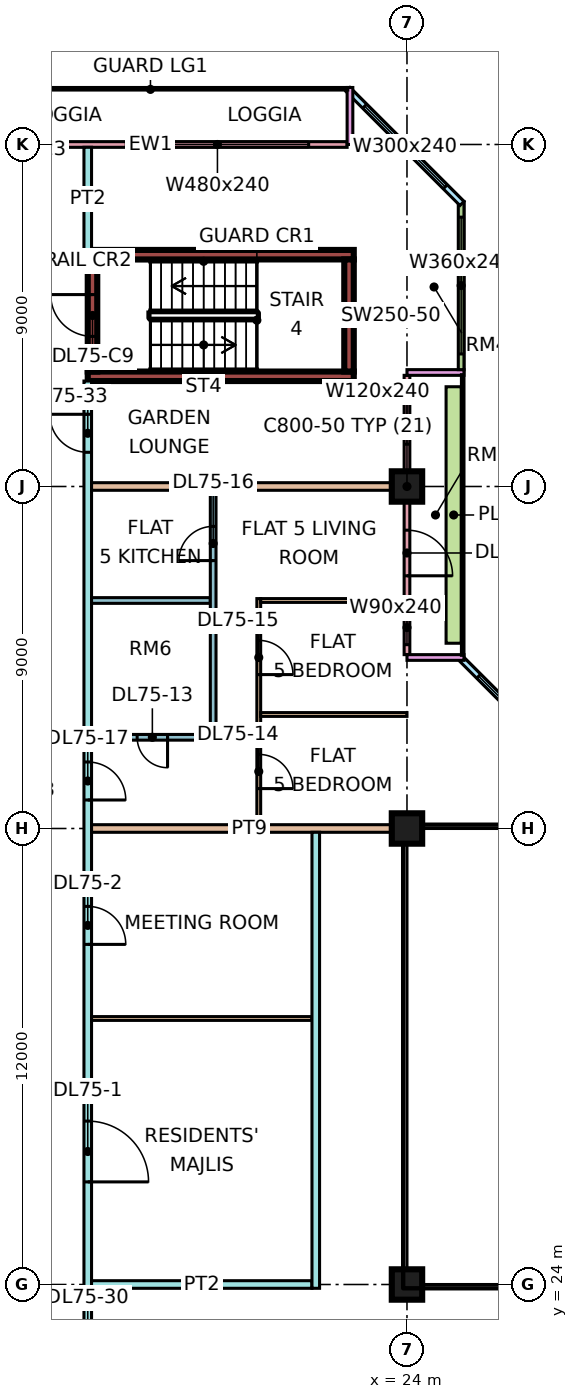
"""IFC4 building model, lengths in metres.
Left out: names, types, materials, properties, quantities, classifications, styles, units other than length and angle.
Written with IfcOpenShell. Run it as: python <this file> out.ifc"""

import sys

from ifc_helpers import new_model, si_unit, direction, frame, frame_2d, origin, origin_2d, place, context, subcontext, project, spatial, rectangle, extrude, element, fill, save


model = new_model("IFC4")
c1 = context("Model", 3, precision=1e-05, world=origin(), true_north=direction((0.0, 1.0)))
c2 = subcontext(c1, "Body", "Model", "MODEL_VIEW")
j1 = project(units=[si_unit("LENGTHUNIT", "METRE"), si_unit("PLANEANGLEUNIT", "RADIAN")], contexts=[c1])
p1 = place(None, origin())
s1 = spatial("IfcSite", under=j1, at=p1, CompositionType="ELEMENT")
p2 = place(p1, origin())
s2 = spatial("IfcBuilding", under=s1, at=p2, CompositionType="ELEMENT")
p3 = place(p2, frame((0.0, 0.0, 318.4)))
s3 = spatial("IfcBuildingStorey", under=s2, at=p3, CompositionType="ELEMENT", Elevation=318.4)
for number, where, z_axis, x_axis in (
    (1, (24.0, 24.0, 0.0), (0.0, 0.0, 1.0), (1.0, 0.0, 0.0)),
    (2, (24.0, 36.0, 0.0), (0.0, 0.0, 1.0), (1.0, 0.0, 0.0)),
    (3, (24.0, 45.0, 0.0), (0.0, 0.0, 1.0), (1.0, 0.0, 0.0)),
):
    element("IfcColumn", number, at=place(p3, frame(where, z_axis=z_axis, x_axis=x_axis)), inside=s3, PredefinedType="COLUMN", context=c2, shape_type="SweptSolid", body=[
        extrude(rectangle(XDim=0.8, YDim=0.8, at=origin_2d()), origin(), (0.0, 0.0, 1.0), 3.75),
    ])
for number, where, z_axis, x_axis in (
    (4, (15.6, 47.9, 0.0), (0.0, 0.0, 1.0), (1.0, 0.0, 0.0)),
    (5, (15.6, 51.1, 0.0), (0.0, 0.0, 1.0), (1.0, 0.0, 0.0)),
):
    element("IfcWall", number, at=place(p3, frame(where, z_axis=z_axis, x_axis=x_axis)), inside=s3, PredefinedType="SHEAR", context=c2, shape_type="SweptSolid", body=[
        extrude(rectangle(XDim=7.0, YDim=0.25, at=frame_2d((3.5, 0.0))), origin(), (0.0, 0.0, 1.0), 3.75),
    ])
p4 = place(p3, frame((15.725, 48.025, 0.0), z_axis=(0.0, 0.0, 1.0), x_axis=(0.0, 1.0, 0.0)))
e6 = element("IfcWall", 6, at=p4, inside=s3, PredefinedType="SHEAR", context=c2, shape_type="SweptSolid", body=[
    extrude(rectangle(XDim=2.95, YDim=0.25, at=frame_2d((1.475, 0.0))), origin(), (0.0, 0.0, 1.0), 3.75),
])
p5 = place(p4, frame((0.925, 0.0, 0.0)))
e7 = element("IfcOpeningElement", 7, at=p5, cuts=e6, PredefinedType="OPENING", context=c2, shape_type="SweptSolid", body=[
    extrude(rectangle(XDim=1.1, YDim=2.2, at=frame_2d((0.55, 1.1))), frame((0.0, 0.135, 0.0), z_axis=(0.0, -1.0, 0.0), x_axis=(1.0, 0.0, 0.0)), (0.0, 0.0, 1.0), 0.27),
])
p6 = place(p3, frame((22.475, 48.025, 0.0), z_axis=(0.0, 0.0, 1.0), x_axis=(0.0, 1.0, 0.0)))
e8 = element("IfcWall", 8, at=p6, inside=s3, PredefinedType="SHEAR", context=c2, shape_type="SweptSolid", body=[
    extrude(rectangle(XDim=2.95, YDim=0.25, at=frame_2d((1.475, 0.0))), origin(), (0.0, 0.0, 1.0), 3.75),
])
p7 = place(p3, frame((28.447, 37.447, 0.0), z_axis=(0.0, 0.0, 1.0), x_axis=(-0.707106781187, 0.707106781187, 0.0)))
e9 = element("IfcWall", 9, at=p7, inside=s3, PredefinedType="SOLIDWALL", context=c2, shape_type="SweptSolid", body=[
    extrude(rectangle(XDim=4.243, YDim=0.15, at=frame_2d((2.121, 0.0))), origin(), (0.0, 0.0, 1.0), 3.3),
])
p8 = place(p7, frame((0.621, 0.0, 0.45)))
e10 = element("IfcOpeningElement", 10, at=p8, cuts=e9, PredefinedType="OPENING", context=c2, shape_type="SweptSolid", body=[
    extrude(rectangle(XDim=3.0, YDim=2.4, at=frame_2d((1.5, 1.2))), frame((0.0, 0.085, 0.0), z_axis=(0.0, -1.0, 0.0), x_axis=(1.0, 0.0, 0.0)), (0.0, 0.0, 1.0), 0.17),
])
p9 = place(p3, frame((24.0, 40.575, 0.0), z_axis=(0.0, 0.0, 1.0), x_axis=(0.0, 1.0, 0.0)))
e11 = element("IfcWall", 11, at=p9, inside=s3, PredefinedType="SOLIDWALL", context=c2, shape_type="SweptSolid", body=[
    extrude(rectangle(XDim=7.35, YDim=0.15, at=frame_2d((3.675, 0.0))), origin(), (0.0, 0.0, 1.0), 3.3),
])
p10 = place(p9, frame((0.262, 0.0, 0.45)))
e12 = element("IfcOpeningElement", 12, at=p10, cuts=e11, PredefinedType="OPENING", context=c2, shape_type="SweptSolid", body=[
    extrude(rectangle(XDim=0.9, YDim=2.4, at=frame_2d((0.45, 1.2))), frame((0.0, 0.085, 0.0), z_axis=(0.0, -1.0, 0.0), x_axis=(1.0, 0.0, 0.0)), (0.0, 0.0, 1.0), 0.17),
])
p11 = place(p9, frame((2.075, 0.0, 0.0)))
e13 = element("IfcOpeningElement", 13, at=p11, cuts=e11, PredefinedType="OPENING", context=c2, shape_type="SweptSolid", body=[
    extrude(rectangle(XDim=1.2, YDim=2.4, at=frame_2d((0.6, 1.2))), frame((0.0, 0.085, 0.0), z_axis=(0.0, -1.0, 0.0), x_axis=(1.0, 0.0, 0.0)), (0.0, 0.0, 1.0), 0.17),
])
p12 = place(p9, frame((5.538, 0.0, 0.45)))
e14 = element("IfcOpeningElement", 14, at=p12, cuts=e11, PredefinedType="OPENING", context=c2, shape_type="SweptSolid", body=[
    extrude(rectangle(XDim=1.2, YDim=2.4, at=frame_2d((0.6, 1.2))), frame((0.0, 0.085, 0.0), z_axis=(0.0, -1.0, 0.0), x_axis=(1.0, 0.0, 0.0)), (0.0, 0.0, 1.0), 0.17),
])
for number, where, z_axis, x_axis in (
    (15, (25.5, 40.5, 0.0), (0.0, 0.0, 1.0), (-1.0, 0.0, 0.0)),
    (16, (25.5, 48.0, 0.0), (0.0, 0.0, 1.0), (-1.0, 0.0, 0.0)),
):
    element("IfcWall", number, at=place(p3, frame(where, z_axis=z_axis, x_axis=x_axis)), inside=s3, PredefinedType="SOLIDWALL", context=c2, shape_type="SweptSolid", body=[
        extrude(rectangle(XDim=1.5, YDim=0.15, at=frame_2d((0.75, 0.0))), origin(), (0.0, 0.0, 1.0), 3.3),
    ])
p13 = place(p3, frame((25.425, 48.075, 0.0), z_axis=(0.0, 0.0, 1.0), x_axis=(0.0, 1.0, 0.0)))
e17 = element("IfcWall", 17, at=p13, inside=s3, PredefinedType="SOLIDWALL", context=c2, shape_type="SweptSolid", body=[
    extrude(rectangle(XDim=4.425, YDim=0.15, at=frame_2d((2.212, 0.0))), origin(), (0.0, 0.0, 1.0), 3.3),
])
p14 = place(p13, frame((0.413, 0.0, 0.45)))
e18 = element("IfcOpeningElement", 18, at=p14, cuts=e17, PredefinedType="OPENING", context=c2, shape_type="SweptSolid", body=[
    extrude(rectangle(XDim=3.6, YDim=2.4, at=frame_2d((1.8, 1.2))), frame((0.0, 0.085, 0.0), z_axis=(0.0, -1.0, 0.0), x_axis=(1.0, 0.0, 0.0)), (0.0, 0.0, 1.0), 0.17),
])
p15 = place(p3, frame((25.447, 52.447, 0.0), z_axis=(0.0, 0.0, 1.0), x_axis=(-0.707106781187, 0.707106781187, 0.0)))
e19 = element("IfcWall", 19, at=p15, inside=s3, PredefinedType="SOLIDWALL", context=c2, shape_type="SweptSolid", body=[
    extrude(rectangle(XDim=4.243, YDim=0.15, at=frame_2d((2.121, 0.0))), origin(), (0.0, 0.0, 1.0), 3.3),
])
p16 = place(p15, frame((0.621, 0.0, 0.45)))
e20 = element("IfcOpeningElement", 20, at=p16, cuts=e19, PredefinedType="OPENING", context=c2, shape_type="SweptSolid", body=[
    extrude(rectangle(XDim=3.0, YDim=2.4, at=frame_2d((1.5, 1.2))), frame((0.0, 0.085, 0.0), z_axis=(0.0, -1.0, 0.0), x_axis=(1.0, 0.0, 0.0)), (0.0, 0.0, 1.0), 0.17),
])
p17 = place(p3, frame((22.425, 54.0, 0.0), z_axis=(0.0, 0.0, 1.0), x_axis=(-1.0, 0.0, 0.0)))
e21 = element("IfcWall", 21, at=p17, inside=s3, PredefinedType="SOLIDWALL", context=c2, shape_type="SweptSolid", body=[
    extrude(rectangle(XDim=10.35, YDim=0.15, at=frame_2d((5.175, 0.0))), origin(), (0.0, 0.0, 1.0), 3.3),
])
p18 = place(p17, frame((1.012, 0.0, 0.45)))
e22 = element("IfcOpeningElement", 22, at=p18, cuts=e21, PredefinedType="OPENING", context=c2, shape_type="SweptSolid", body=[
    extrude(rectangle(XDim=4.8, YDim=2.4, at=frame_2d((2.4, 1.2))), frame((0.0, 0.085, 0.0), z_axis=(0.0, -1.0, 0.0), x_axis=(1.0, 0.0, 0.0)), (0.0, 0.0, 1.0), 0.17),
])
p19 = place(p3, frame((22.5, 55.5, 0.0), z_axis=(0.0, 0.0, 1.0), x_axis=(0.0, -1.0, 0.0)))
e23 = element("IfcWall", 23, at=p19, inside=s3, PredefinedType="SOLIDWALL", context=c2, shape_type="SweptSolid", body=[
    extrude(rectangle(XDim=1.5, YDim=0.15, at=frame_2d((0.75, 0.0))), origin(), (0.0, 0.0, 1.0), 3.3),
])
p20 = place(p3, frame((25.229, 40.875, 0.0), z_axis=(0.0, 0.0, 1.0), x_axis=(0.0, 1.0, 0.0)))
e24 = element("IfcWall", 24, at=p20, inside=s3, PredefinedType="SOLIDWALL", context=c2, shape_type="SweptSolid", body=[
    extrude(rectangle(XDim=6.75, YDim=0.4, at=frame_2d((3.375, 0.0))), origin(), (0.0, 0.0, 1.0), 0.7),
])
p21 = place(p3, frame((15.6, 20.0, 0.0), z_axis=(0.0, 0.0, 1.0), x_axis=(0.0, 1.0, 0.0)))
e25 = element("IfcWall", 25, at=p21, inside=s3, PredefinedType="PARTITIONING", context=c2, shape_type="SweptSolid", body=[
    extrude(rectangle(XDim=27.775, YDim=0.2, at=frame_2d((13.887, 0.0))), origin(), (0.0, 0.0, 1.0), 3.3),
])
p22 = place(p21, frame((6.7, 0.0, 0.0)))
e26 = element("IfcOpeningElement", 26, at=p22, cuts=e25, PredefinedType="OPENING", context=c2, shape_type="SweptSolid", body=[
    extrude(rectangle(XDim=1.6, YDim=2.1, at=frame_2d((0.8, 1.05))), frame((0.0, 0.11, 0.0), z_axis=(0.0, -1.0, 0.0), x_axis=(1.0, 0.0, 0.0)), (0.0, 0.0, 1.0), 0.22),
])
p23 = place(p21, frame((12.95, 0.0, 0.0)))
e27 = element("IfcOpeningElement", 27, at=p23, cuts=e25, PredefinedType="OPENING", context=c2, shape_type="SweptSolid", body=[
    extrude(rectangle(XDim=1.0, YDim=2.1, at=frame_2d((0.5, 1.05))), frame((0.0, 0.11, 0.0), z_axis=(0.0, -1.0, 0.0), x_axis=(1.0, 0.0, 0.0)), (0.0, 0.0, 1.0), 0.22),
])
p24 = place(p21, frame((16.75, 0.0, 0.0)))
e28 = element("IfcOpeningElement", 28, at=p24, cuts=e25, PredefinedType="OPENING", context=c2, shape_type="SweptSolid", body=[
    extrude(rectangle(XDim=1.0, YDim=2.1, at=frame_2d((0.5, 1.05))), frame((0.0, 0.11, 0.0), z_axis=(0.0, -1.0, 0.0), x_axis=(1.0, 0.0, 0.0)), (0.0, 0.0, 1.0), 0.22),
])
p25 = place(p21, frame((1.15, 0.0, 0.0)))
e29 = element("IfcOpeningElement", 29, at=p25, cuts=e25, PredefinedType="OPENING", context=c2, shape_type="SweptSolid", body=[
    extrude(rectangle(XDim=1.8, YDim=2.1, at=frame_2d((0.9, 1.05))), frame((0.0, 0.11, 0.0), z_axis=(0.0, -1.0, 0.0), x_axis=(1.0, 0.0, 0.0)), (0.0, 0.0, 1.0), 0.22),
])
p26 = place(p21, frame((25.9, 0.0, 0.0)))
e30 = element("IfcOpeningElement", 30, at=p26, cuts=e25, PredefinedType="OPENING", context=c2, shape_type="SweptSolid", body=[
    extrude(rectangle(XDim=1.0, YDim=2.1, at=frame_2d((0.5, 1.05))), frame((0.0, 0.11, 0.0), z_axis=(0.0, -1.0, 0.0), x_axis=(1.0, 0.0, 0.0)), (0.0, 0.0, 1.0), 0.22),
])
p27 = place(p3, frame((15.6, 51.225, 0.0), z_axis=(0.0, 0.0, 1.0), x_axis=(0.0, 1.0, 0.0)))
e31 = element("IfcWall", 31, at=p27, inside=s3, PredefinedType="PARTITIONING", context=c2, shape_type="SweptSolid", body=[
    extrude(rectangle(XDim=2.701, YDim=0.2, at=frame_2d((1.351, 0.0))), origin(), (0.0, 0.0, 1.0), 3.3),
])
p28 = place(p3, frame((15.7, 24.0, 0.0), z_axis=(0.0, 0.0, 1.0), x_axis=(1.0, 0.0, 0.0)))
e32 = element("IfcWall", 32, at=p28, inside=s3, PredefinedType="PARTITIONING", context=c2, shape_type="SweptSolid", body=[
    extrude(rectangle(XDim=5.8, YDim=0.2, at=frame_2d((2.9, 0.0))), origin(), (0.0, 0.0, 1.0), 3.3),
])
p29 = place(p3, frame((15.7, 31.0, 0.0), z_axis=(0.0, 0.0, 1.0), x_axis=(1.0, 0.0, 0.0)))
e33 = element("IfcWall", 33, at=p29, inside=s3, PredefinedType="PARTITIONING", context=c2, shape_type="SweptSolid", body=[
    extrude(rectangle(XDim=5.8, YDim=0.1, at=frame_2d((2.9, 0.0))), origin(), (0.0, 0.0, 1.0), 3.3),
])
p30 = place(p3, frame((15.7, 36.0, 0.0), z_axis=(0.0, 0.0, 1.0), x_axis=(1.0, 0.0, 0.0)))
e34 = element("IfcWall", 34, at=p30, inside=s3, PredefinedType="PARTITIONING", context=c2, shape_type="SweptSolid", body=[
    extrude(rectangle(XDim=8.3, YDim=0.2, at=frame_2d((4.15, 0.0))), origin(), (0.0, 0.0, 1.0), 3.3),
])
p31 = place(p3, frame((15.7, 38.4, 0.0), z_axis=(0.0, 0.0, 1.0), x_axis=(1.0, 0.0, 0.0)))
e35 = element("IfcWall", 35, at=p31, inside=s3, PredefinedType="PARTITIONING", context=c2, shape_type="SweptSolid", body=[
    extrude(rectangle(XDim=3.125, YDim=0.15, at=frame_2d((1.562, 0.0))), origin(), (0.0, 0.0, 1.0), 3.3),
])
p32 = place(p31, frame((1.2, 0.0, 0.0)))
e36 = element("IfcOpeningElement", 36, at=p32, cuts=e35, PredefinedType="OPENING", context=c2, shape_type="SweptSolid", body=[
    extrude(rectangle(XDim=0.8, YDim=2.1, at=frame_2d((0.4, 1.05))), frame((0.0, 0.085, 0.0), z_axis=(0.0, -1.0, 0.0), x_axis=(1.0, 0.0, 0.0)), (0.0, 0.0, 1.0), 0.17),
])
p33 = place(p3, frame((15.7, 42.0, 0.0), z_axis=(0.0, 0.0, 1.0), x_axis=(1.0, 0.0, 0.0)))
e37 = element("IfcWall", 37, at=p33, inside=s3, PredefinedType="PARTITIONING", context=c2, shape_type="SweptSolid", body=[
    extrude(rectangle(XDim=3.125, YDim=0.15, at=frame_2d((1.562, 0.0))), origin(), (0.0, 0.0, 1.0), 3.3),
])
p34 = place(p3, frame((15.7, 45.0, 0.0), z_axis=(0.0, 0.0, 1.0), x_axis=(1.0, 0.0, 0.0)))
e38 = element("IfcWall", 38, at=p34, inside=s3, PredefinedType="PARTITIONING", context=c2, shape_type="SweptSolid", body=[
    extrude(rectangle(XDim=8.226, YDim=0.2, at=frame_2d((4.113, 0.0))), origin(), (0.0, 0.0, 1.0), 3.3),
])
p35 = place(p3, frame((18.9, 38.325, 0.0), z_axis=(0.0, 0.0, 1.0), x_axis=(0.0, 1.0, 0.0)))
e39 = element("IfcWall", 39, at=p35, inside=s3, PredefinedType="PARTITIONING", context=c2, shape_type="SweptSolid", body=[
    extrude(rectangle(XDim=6.575, YDim=0.15, at=frame_2d((3.288, 0.0))), origin(), (0.0, 0.0, 1.0), 3.3),
])
p36 = place(p35, frame((4.725, 0.0, 0.0)))
e40 = element("IfcOpeningElement", 40, at=p36, cuts=e39, PredefinedType="OPENING", context=c2, shape_type="SweptSolid", body=[
    extrude(rectangle(XDim=0.9, YDim=2.1, at=frame_2d((0.45, 1.05))), frame((0.0, 0.085, 0.0), z_axis=(0.0, -1.0, 0.0), x_axis=(1.0, 0.0, 0.0)), (0.0, 0.0, 1.0), 0.17),
])
p37 = place(p3, frame((20.1, 36.1, 0.0), z_axis=(0.0, 0.0, 1.0), x_axis=(0.0, 1.0, 0.0)))
e41 = element("IfcWall", 41, at=p37, inside=s3, PredefinedType="PARTITIONING", context=c2, shape_type="SweptSolid", body=[
    extrude(rectangle(XDim=5.95, YDim=0.1, at=frame_2d((2.975, 0.0))), origin(), (0.0, 0.0, 1.0), 3.3),
])
p38 = place(p37, frame((0.95, 0.0, 0.0)))
e42 = element("IfcOpeningElement", 42, at=p38, cuts=e41, PredefinedType="OPENING", context=c2, shape_type="SweptSolid", body=[
    extrude(rectangle(XDim=0.9, YDim=2.1, at=frame_2d((0.45, 1.05))), frame((0.0, 0.06, 0.0), z_axis=(0.0, -1.0, 0.0), x_axis=(1.0, 0.0, 0.0)), (0.0, 0.0, 1.0), 0.12),
])
p39 = place(p37, frame((3.95, 0.0, 0.0)))
e43 = element("IfcOpeningElement", 43, at=p39, cuts=e41, PredefinedType="OPENING", context=c2, shape_type="SweptSolid", body=[
    extrude(rectangle(XDim=0.9, YDim=2.1, at=frame_2d((0.45, 1.05))), frame((0.0, 0.06, 0.0), z_axis=(0.0, -1.0, 0.0), x_axis=(1.0, 0.0, 0.0)), (0.0, 0.0, 1.0), 0.12),
])
p40 = place(p3, frame((20.15, 39.0, 0.0), z_axis=(0.0, 0.0, 1.0), x_axis=(1.0, 0.0, 0.0)))
e44 = element("IfcWall", 44, at=p40, inside=s3, PredefinedType="PARTITIONING", context=c2, shape_type="SweptSolid", body=[
    extrude(rectangle(XDim=3.85, YDim=0.1, at=frame_2d((1.925, 0.0))), origin(), (0.0, 0.0, 1.0), 3.3),
])
p41 = place(p3, frame((20.15, 42.0, 0.0), z_axis=(0.0, 0.0, 1.0), x_axis=(1.0, 0.0, 0.0)))
e45 = element("IfcWall", 45, at=p41, inside=s3, PredefinedType="PARTITIONING", context=c2, shape_type="SweptSolid", body=[
    extrude(rectangle(XDim=3.776, YDim=0.1, at=frame_2d((1.888, 0.0))), origin(), (0.0, 0.0, 1.0), 3.3),
])
p42 = place(p3, frame((21.6, 23.9, 0.0), z_axis=(0.0, 0.0, 1.0), x_axis=(0.0, 1.0, 0.0)))
e46 = element("IfcWall", 46, at=p42, inside=s3, PredefinedType="PARTITIONING", context=c2, shape_type="SweptSolid", body=[
    extrude(rectangle(XDim=12.0, YDim=0.2, at=frame_2d((6.0, 0.0))), origin(), (0.0, 0.0, 1.0), 3.3),
])
p43 = place(p8, origin())
e47 = element("IfcWindow", 47, at=p43, inside=s3, PartitioningType="SINGLE_PANEL", PredefinedType="WINDOW", context=c2, shape_type="SweptSolid", body=[
    extrude(rectangle(XDim=3.0, YDim=2.4, at=frame_2d((1.5, 1.2))), frame((0.0, 0.03, 0.0), z_axis=(0.0, -1.0, 0.0), x_axis=(1.0, 0.0, 0.0)), (0.0, 0.0, 1.0), 0.06),
])
fill(e10, e47)
p44 = place(p10, origin())
e48 = element("IfcWindow", 48, at=p44, inside=s3, PartitioningType="SINGLE_PANEL", PredefinedType="WINDOW", context=c2, shape_type="SweptSolid", body=[
    extrude(rectangle(XDim=0.9, YDim=2.4, at=frame_2d((0.45, 1.2))), frame((0.0, 0.03, 0.0), z_axis=(0.0, -1.0, 0.0), x_axis=(1.0, 0.0, 0.0)), (0.0, 0.0, 1.0), 0.06),
])
fill(e12, e48)
p45 = place(p11, frame((1.2, 0.0, 0.0), z_axis=(0.0, 0.0, 1.0), x_axis=(-1.0, 0.0, 0.0)))
e49 = element("IfcDoor", 49, at=p45, inside=s3, OperationType="DOUBLE_DOOR_SINGLE_SWING", PredefinedType="DOOR", context=c2, shape_type="SweptSolid", body=[
    extrude(rectangle(XDim=1.2, YDim=2.4, at=frame_2d((0.6, 1.2))), frame((0.0, 0.025, 0.0), z_axis=(0.0, -1.0, 0.0), x_axis=(1.0, 0.0, 0.0)), (0.0, 0.0, 1.0), 0.05),
])
fill(e13, e49)
p46 = place(p12, origin())
e50 = element("IfcWindow", 50, at=p46, inside=s3, PartitioningType="SINGLE_PANEL", PredefinedType="WINDOW", context=c2, shape_type="SweptSolid", body=[
    extrude(rectangle(XDim=1.2, YDim=2.4, at=frame_2d((0.6, 1.2))), frame((0.0, 0.03, 0.0), z_axis=(0.0, -1.0, 0.0), x_axis=(1.0, 0.0, 0.0)), (0.0, 0.0, 1.0), 0.06),
])
fill(e14, e50)
p47 = place(p14, origin())
e51 = element("IfcWindow", 51, at=p47, inside=s3, PartitioningType="SINGLE_PANEL", PredefinedType="WINDOW", context=c2, shape_type="SweptSolid", body=[
    extrude(rectangle(XDim=3.6, YDim=2.4, at=frame_2d((1.8, 1.2))), frame((0.0, 0.03, 0.0), z_axis=(0.0, -1.0, 0.0), x_axis=(1.0, 0.0, 0.0)), (0.0, 0.0, 1.0), 0.06),
])
fill(e18, e51)
p48 = place(p16, origin())
e52 = element("IfcWindow", 52, at=p48, inside=s3, PartitioningType="SINGLE_PANEL", PredefinedType="WINDOW", context=c2, shape_type="SweptSolid", body=[
    extrude(rectangle(XDim=3.0, YDim=2.4, at=frame_2d((1.5, 1.2))), frame((0.0, 0.03, 0.0), z_axis=(0.0, -1.0, 0.0), x_axis=(1.0, 0.0, 0.0)), (0.0, 0.0, 1.0), 0.06),
])
fill(e20, e52)
p49 = place(p18, origin())
e53 = element("IfcWindow", 53, at=p49, inside=s3, PartitioningType="SINGLE_PANEL", PredefinedType="WINDOW", context=c2, shape_type="SweptSolid", body=[
    extrude(rectangle(XDim=4.8, YDim=2.4, at=frame_2d((2.4, 1.2))), frame((0.0, 0.03, 0.0), z_axis=(0.0, -1.0, 0.0), x_axis=(1.0, 0.0, 0.0)), (0.0, 0.0, 1.0), 0.06),
])
fill(e22, e53)
p50 = place(p5, frame((1.1, 0.0, 0.0), z_axis=(0.0, 0.0, 1.0), x_axis=(-1.0, 0.0, 0.0)))
e54 = element("IfcDoor", 54, at=p50, inside=s3, OperationType="SINGLE_SWING_RIGHT", PredefinedType="DOOR", context=c2, shape_type="SweptSolid", body=[
    extrude(rectangle(XDim=1.1, YDim=2.2, at=frame_2d((0.55, 1.1))), frame((0.0, 0.025, 0.0), z_axis=(0.0, -1.0, 0.0), x_axis=(1.0, 0.0, 0.0)), (0.0, 0.0, 1.0), 0.05),
])
fill(e7, e54)
p51 = place(p22, frame((1.6, 0.0, 0.0), z_axis=(0.0, 0.0, 1.0), x_axis=(-1.0, 0.0, 0.0)))
e55 = element("IfcDoor", 55, at=p51, inside=s3, OperationType="DOUBLE_DOOR_SINGLE_SWING", PredefinedType="DOOR", context=c2, shape_type="SweptSolid", body=[
    extrude(rectangle(XDim=1.6, YDim=2.1, at=frame_2d((0.8, 1.05))), frame((0.0, 0.025, 0.0), z_axis=(0.0, -1.0, 0.0), x_axis=(1.0, 0.0, 0.0)), (0.0, 0.0, 1.0), 0.05),
])
fill(e26, e55)
p52 = place(p23, frame((1.0, 0.0, 0.0), z_axis=(0.0, 0.0, 1.0), x_axis=(-1.0, 0.0, 0.0)))
e56 = element("IfcDoor", 56, at=p52, inside=s3, OperationType="SINGLE_SWING_LEFT", PredefinedType="DOOR", context=c2, shape_type="SweptSolid", body=[
    extrude(rectangle(XDim=1.0, YDim=2.1, at=frame_2d((0.5, 1.05))), frame((0.0, 0.025, 0.0), z_axis=(0.0, -1.0, 0.0), x_axis=(1.0, 0.0, 0.0)), (0.0, 0.0, 1.0), 0.05),
])
fill(e27, e56)
p53 = place(p32, origin())
e57 = element("IfcDoor", 57, at=p53, inside=s3, OperationType="SINGLE_SWING_RIGHT", PredefinedType="DOOR", context=c2, shape_type="SweptSolid", body=[
    extrude(rectangle(XDim=0.8, YDim=2.1, at=frame_2d((0.4, 1.05))), frame((0.0, 0.025, 0.0), z_axis=(0.0, -1.0, 0.0), x_axis=(1.0, 0.0, 0.0)), (0.0, 0.0, 1.0), 0.05),
])
fill(e36, e57)
p54 = place(p38, frame((0.9, 0.0, 0.0), z_axis=(0.0, 0.0, 1.0), x_axis=(-1.0, 0.0, 0.0)))
e58 = element("IfcDoor", 58, at=p54, inside=s3, OperationType="SINGLE_SWING_LEFT", PredefinedType="DOOR", context=c2, shape_type="SweptSolid", body=[
    extrude(rectangle(XDim=0.9, YDim=2.1, at=frame_2d((0.45, 1.05))), frame((0.0, 0.025, 0.0), z_axis=(0.0, -1.0, 0.0), x_axis=(1.0, 0.0, 0.0)), (0.0, 0.0, 1.0), 0.05),
])
fill(e42, e58)
p55 = place(p39, frame((0.9, 0.0, 0.0), z_axis=(0.0, 0.0, 1.0), x_axis=(-1.0, 0.0, 0.0)))
e59 = element("IfcDoor", 59, at=p55, inside=s3, OperationType="SINGLE_SWING_LEFT", PredefinedType="DOOR", context=c2, shape_type="SweptSolid", body=[
    extrude(rectangle(XDim=0.9, YDim=2.1, at=frame_2d((0.45, 1.05))), frame((0.0, 0.025, 0.0), z_axis=(0.0, -1.0, 0.0), x_axis=(1.0, 0.0, 0.0)), (0.0, 0.0, 1.0), 0.05),
])
fill(e43, e59)
p56 = place(p36, origin())
e60 = element("IfcDoor", 60, at=p56, inside=s3, OperationType="SINGLE_SWING_LEFT", PredefinedType="DOOR", context=c2, shape_type="SweptSolid", body=[
    extrude(rectangle(XDim=0.9, YDim=2.1, at=frame_2d((0.45, 1.05))), frame((0.0, 0.025, 0.0), z_axis=(0.0, -1.0, 0.0), x_axis=(1.0, 0.0, 0.0)), (0.0, 0.0, 1.0), 0.05),
])
fill(e40, e60)
p57 = place(p24, frame((1.0, 0.0, 0.0), z_axis=(0.0, 0.0, 1.0), x_axis=(-1.0, 0.0, 0.0)))
e61 = element("IfcDoor", 61, at=p57, inside=s3, OperationType="SINGLE_SWING_LEFT", PredefinedType="DOOR", context=c2, shape_type="SweptSolid", body=[
    extrude(rectangle(XDim=1.0, YDim=2.1, at=frame_2d((0.5, 1.05))), frame((0.0, 0.025, 0.0), z_axis=(0.0, -1.0, 0.0), x_axis=(1.0, 0.0, 0.0)), (0.0, 0.0, 1.0), 0.05),
])
fill(e28, e61)
p58 = place(p26, frame((1.0, 0.0, 0.0), z_axis=(0.0, 0.0, 1.0), x_axis=(-1.0, 0.0, 0.0)))
e62 = element("IfcDoor", 62, at=p58, inside=s3, OperationType="SINGLE_SWING_RIGHT", PredefinedType="DOOR", context=c2, shape_type="SweptSolid", body=[
    extrude(rectangle(XDim=1.0, YDim=2.1, at=frame_2d((0.5, 1.05))), frame((0.0, 0.025, 0.0), z_axis=(0.0, -1.0, 0.0), x_axis=(1.0, 0.0, 0.0)), (0.0, 0.0, 1.0), 0.05),
])
fill(e30, e62)
save(model, sys.argv[1])
